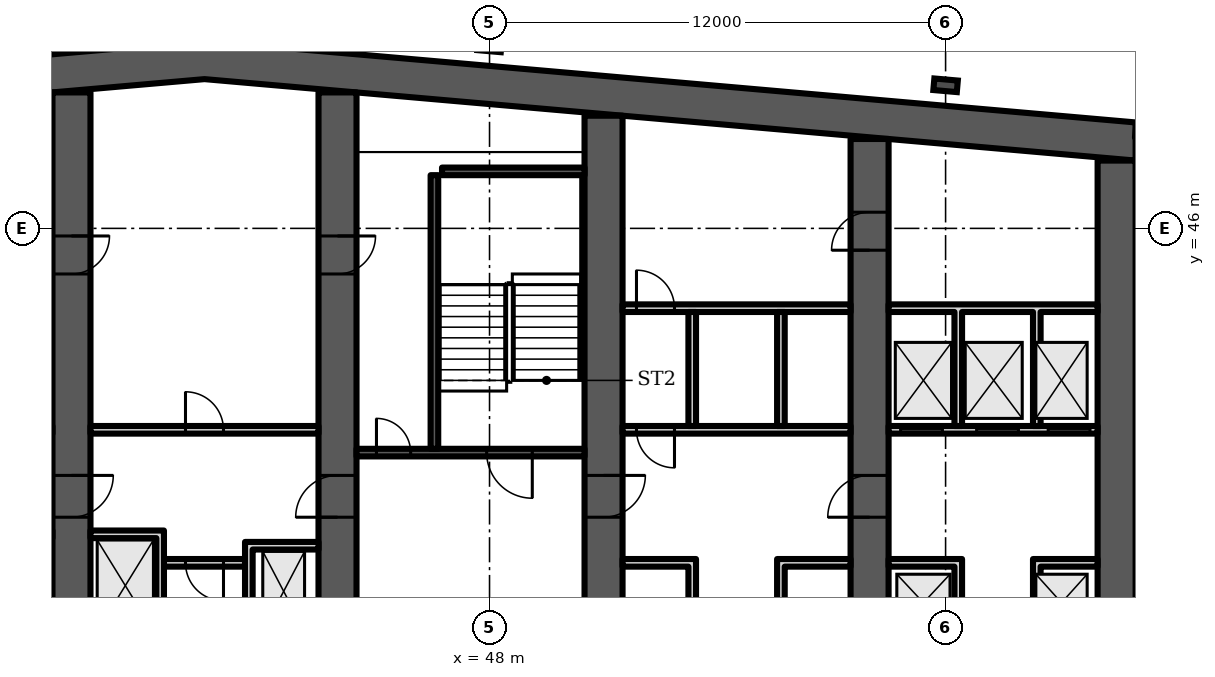
"""IFC4 building model, lengths in metres.
Left out: names, types, materials, properties, quantities, classifications, styles, units other than length and angle.
Written with IfcOpenShell. Run it as: python <this file> out.ifc"""

import sys

from ifc_helpers import new_model, si_unit, direction, frame, frame_2d, origin, origin_2d, place, context, subcontext, project, spatial, polyline, rectangle, i_section, outline, extrude, element, fill, save


model = new_model("IFC4")
c1 = context("Model", 3, precision=1e-05, world=origin(), true_north=direction((0.0, 1.0)))
c2 = subcontext(c1, "Body", "Model", "MODEL_VIEW")
j1 = project(units=[si_unit("LENGTHUNIT", "METRE"), si_unit("PLANEANGLEUNIT", "RADIAN")], contexts=[c1])
p1 = place(None, origin())
s1 = spatial("IfcSite", under=j1, at=p1, CompositionType="ELEMENT")
p2 = place(p1, origin())
s2 = spatial("IfcBuilding", under=s1, at=p2, CompositionType="ELEMENT")
p3 = place(p2, frame((0.0, 0.0, 121.9)))
s3 = spatial("IfcBuildingStorey", under=s2, at=p3, CompositionType="ELEMENT", Elevation=121.9)
p4 = place(p3, origin())
e1 = element("IfcWall", 1, at=p4, inside=s3, PredefinedType="SHEAR", context=c2, shape_type="SweptSolid", body=[
    extrude(outline(polyline([(16.0, 47.784), (40.5, 49.927), (65.0, 47.784), (65.0, 48.787), (40.5, 50.931), (16.0, 48.787), (16.0, 47.784)])), origin(), (0.0, 0.0, 1.0), 3.6),
])
p5 = place(p3, frame((37.0, 35.0, 0.0), z_axis=(0.0, 0.0, 1.0), x_axis=(0.0, 1.0, 0.0)))
e2 = element("IfcWall", 2, at=p5, inside=s3, PredefinedType="SHEAR", context=c2, shape_type="SweptSolid", body=[
    extrude(rectangle(XDim=14.577, YDim=1.0, at=frame_2d((7.289, 0.0))), origin(), (0.0, 0.0, 1.0), 3.6),
])
p6 = place(p5, frame((3.4, 0.0, 0.0)))
e3 = element("IfcOpeningElement", 3, at=p6, cuts=e2, PredefinedType="OPENING", context=c2, shape_type="SweptSolid", body=[
    extrude(rectangle(XDim=1.1, YDim=2.1, at=frame_2d((0.55, 1.05))), frame((0.0, 0.51, 0.0), z_axis=(0.0, -1.0, 0.0), x_axis=(1.0, 0.0, 0.0)), (0.0, 0.0, 1.0), 1.02),
])
p7 = place(p5, frame((9.8, 0.0, 0.0)))
e4 = element("IfcOpeningElement", 4, at=p7, cuts=e2, PredefinedType="OPENING", context=c2, shape_type="SweptSolid", body=[
    extrude(rectangle(XDim=1.0, YDim=2.1, at=frame_2d((0.5, 1.05))), frame((0.0, 0.51, 0.0), z_axis=(0.0, -1.0, 0.0), x_axis=(1.0, 0.0, 0.0)), (0.0, 0.0, 1.0), 1.02),
])
p8 = place(p3, frame((44.0, 35.0, 0.0), z_axis=(0.0, 0.0, 1.0), x_axis=(0.0, 1.0, 0.0)))
e5 = element("IfcWall", 5, at=p8, inside=s3, PredefinedType="SHEAR", context=c2, shape_type="SweptSolid", body=[
    extrude(rectangle(XDim=14.577, YDim=1.0, at=frame_2d((7.289, 0.0))), origin(), (0.0, 0.0, 1.0), 3.6),
])
p9 = place(p8, frame((3.4, 0.0, 0.0)))
e6 = element("IfcOpeningElement", 6, at=p9, cuts=e5, PredefinedType="OPENING", context=c2, shape_type="SweptSolid", body=[
    extrude(rectangle(XDim=1.1, YDim=2.1, at=frame_2d((0.55, 1.05))), frame((0.0, 0.51, 0.0), z_axis=(0.0, -1.0, 0.0), x_axis=(1.0, 0.0, 0.0)), (0.0, 0.0, 1.0), 1.02),
])
p10 = place(p8, frame((9.8, 0.0, 0.0)))
e7 = element("IfcOpeningElement", 7, at=p10, cuts=e5, PredefinedType="OPENING", context=c2, shape_type="SweptSolid", body=[
    extrude(rectangle(XDim=1.0, YDim=2.1, at=frame_2d((0.5, 1.05))), frame((0.0, 0.51, 0.0), z_axis=(0.0, -1.0, 0.0), x_axis=(1.0, 0.0, 0.0)), (0.0, 0.0, 1.0), 1.02),
])
p11 = place(p3, frame((51.0, 35.0, 0.0), z_axis=(0.0, 0.0, 1.0), x_axis=(0.0, 1.0, 0.0)))
e8 = element("IfcWall", 8, at=p11, inside=s3, PredefinedType="SHEAR", context=c2, shape_type="SweptSolid", body=[
    extrude(rectangle(XDim=13.965, YDim=1.0, at=frame_2d((6.982, 0.0))), origin(), (0.0, 0.0, 1.0), 3.6),
])
p12 = place(p11, frame((3.4, 0.0, 0.0)))
e9 = element("IfcOpeningElement", 9, at=p12, cuts=e8, PredefinedType="OPENING", context=c2, shape_type="SweptSolid", body=[
    extrude(rectangle(XDim=1.1, YDim=2.1, at=frame_2d((0.55, 1.05))), frame((0.0, 0.51, 0.0), z_axis=(0.0, -1.0, 0.0), x_axis=(1.0, 0.0, 0.0)), (0.0, 0.0, 1.0), 1.02),
])
p13 = place(p3, frame((58.0, 35.0, 0.0), z_axis=(0.0, 0.0, 1.0), x_axis=(0.0, 1.0, 0.0)))
e10 = element("IfcWall", 10, at=p13, inside=s3, PredefinedType="SHEAR", context=c2, shape_type="SweptSolid", body=[
    extrude(rectangle(XDim=13.352, YDim=1.0, at=frame_2d((6.676, 0.0))), origin(), (0.0, 0.0, 1.0), 3.6),
])
p14 = place(p13, frame((10.426, 0.0, 0.0)))
e11 = element("IfcOpeningElement", 11, at=p14, cuts=e10, PredefinedType="OPENING", context=c2, shape_type="SweptSolid", body=[
    extrude(rectangle(XDim=1.0, YDim=2.1, at=frame_2d((0.5, 1.05))), frame((0.0, 0.51, 0.0), z_axis=(0.0, -1.0, 0.0), x_axis=(1.0, 0.0, 0.0)), (0.0, 0.0, 1.0), 1.02),
])
p15 = place(p13, frame((3.4, 0.0, 0.0)))
e12 = element("IfcOpeningElement", 12, at=p15, cuts=e10, PredefinedType="OPENING", context=c2, shape_type="SweptSolid", body=[
    extrude(rectangle(XDim=1.1, YDim=2.1, at=frame_2d((0.55, 1.05))), frame((0.0, 0.51, 0.0), z_axis=(0.0, -1.0, 0.0), x_axis=(1.0, 0.0, 0.0)), (0.0, 0.0, 1.0), 1.02),
])
p16 = place(p3, frame((64.5, 35.0, 0.0), z_axis=(0.0, 0.0, 1.0), x_axis=(0.0, 1.0, 0.0)))
e13 = element("IfcWall", 13, at=p16, inside=s3, PredefinedType="SHEAR", context=c2, shape_type="SweptSolid", body=[
    extrude(rectangle(XDim=12.784, YDim=1.0, at=frame_2d((6.392, 0.0))), origin(), (0.0, 0.0, 1.0), 3.6),
])
for number, where, z_axis, x_axis in (
    (14, (48.0, 50.815, 0.0), (0.0, 0.0, 1.0), (0.087, 0.996, 0.0)),
    (15, (60.0, 49.765, 0.0), (0.0, 0.0, 1.0), (0.087, 0.996, 0.0)),
):
    element("IfcColumn", number, at=place(p3, frame(where, z_axis=z_axis, x_axis=x_axis)), inside=s3, PredefinedType="COLUMN", context=c2, shape_type="SweptSolid", body=[
        extrude(i_section(OverallWidth=0.305, OverallDepth=0.62, WebThickness=0.021, FlangeThickness=0.04, FilletRadius=0.027, at=origin_2d()), origin(), (0.0, 0.0, 1.0), 3.6),
    ])
p17 = place(p3, frame((67.983, 48.326, 0.0), z_axis=(0.0, 0.0, 1.0), x_axis=(-0.996194, 0.087168, 0.0)))
e16 = element("IfcWall", 16, at=p17, inside=s3, PredefinedType="SOLIDWALL", context=c2, shape_type="SweptSolid", body=[
    extrude(rectangle(XDim=2.994, YDim=0.4, at=frame_2d((1.497, 0.0))), origin(), (0.0, 0.0, 1.0), 3.2),
])
p18 = place(p3, frame((39.433, 37.2, 0.0), z_axis=(0.0, 0.0, 1.0), x_axis=(1.0, 0.0, 0.0)))
e17 = element("IfcWall", 17, at=p18, inside=s3, PredefinedType="PARTITIONING", context=c2, shape_type="SweptSolid", body=[
    extrude(rectangle(XDim=2.133, YDim=0.2, at=frame_2d((1.067, 0.0))), origin(), (0.0, 0.0, 1.0), 3.2),
])
p19 = place(p18, frame((0.567, 0.0, 0.0)))
e18 = element("IfcOpeningElement", 18, at=p19, cuts=e17, PredefinedType="OPENING", context=c2, shape_type="SweptSolid", body=[
    extrude(rectangle(XDim=1.0, YDim=2.1, at=frame_2d((0.5, 1.05))), frame((0.0, 0.11, 0.0), z_axis=(0.0, -1.0, 0.0), x_axis=(1.0, 0.0, 0.0)), (0.0, 0.0, 1.0), 0.22),
])
p20 = place(p3, frame((37.5, 40.7, 0.0), z_axis=(0.0, 0.0, 1.0), x_axis=(1.0, 0.0, 0.0)))
e19 = element("IfcWall", 19, at=p20, inside=s3, PredefinedType="PARTITIONING", context=c2, shape_type="SweptSolid", body=[
    extrude(rectangle(XDim=6.0, YDim=0.2, at=frame_2d((3.0, 0.0))), origin(), (0.0, 0.0, 1.0), 3.2),
])
p21 = place(p20, frame((2.5, 0.0, 0.0)))
e20 = element("IfcOpeningElement", 20, at=p21, cuts=e19, PredefinedType="OPENING", context=c2, shape_type="SweptSolid", body=[
    extrude(rectangle(XDim=1.0, YDim=2.1, at=frame_2d((0.5, 1.05))), frame((0.0, 0.11, 0.0), z_axis=(0.0, -1.0, 0.0), x_axis=(1.0, 0.0, 0.0)), (0.0, 0.0, 1.0), 0.22),
])
p22 = place(p3, origin())
e21 = element("IfcWall", 21, at=p22, inside=s3, PredefinedType="PARTITIONING", context=c2, shape_type="SweptSolid", body=[
    extrude(outline(polyline([(41.567, 37.75), (41.767, 37.75), (43.5, 37.75), (43.5, 37.55), (41.767, 37.55), (41.767, 35.0), (41.567, 35.0), (41.567, 37.75)])), origin(), (0.0, 0.0, 1.0), 3.2),
])
p23 = place(p3, origin())
e22 = element("IfcWall", 22, at=p23, inside=s3, PredefinedType="PARTITIONING", context=c2, shape_type="SweptSolid", body=[
    extrude(outline(polyline([(39.233, 37.85), (37.5, 37.85), (37.5, 38.05), (39.233, 38.05), (39.433, 38.05), (39.433, 35.0), (39.233, 35.0), (39.233, 37.85)])), origin(), (0.0, 0.0, 1.0), 3.2),
])
p24 = place(p3, frame((44.5, 40.1, 0.0), z_axis=(0.0, 0.0, 1.0), x_axis=(1.0, 0.0, 0.0)))
e23 = element("IfcWall", 23, at=p24, inside=s3, PredefinedType="SHEAR", context=c2, shape_type="SweptSolid", body=[
    extrude(rectangle(XDim=6.0, YDim=0.2, at=frame_2d((3.0, 0.0))), origin(), (0.0, 0.0, 1.0), 3.2),
])
p25 = place(p24, frame((3.425, 0.0, 0.0)))
e24 = element("IfcOpeningElement", 24, at=p25, cuts=e23, PredefinedType="OPENING", context=c2, shape_type="SweptSolid", body=[
    extrude(rectangle(XDim=1.2, YDim=2.1, at=frame_2d((0.6, 1.05))), frame((0.0, 0.11, 0.0), z_axis=(0.0, -1.0, 0.0), x_axis=(1.0, 0.0, 0.0)), (0.0, 0.0, 1.0), 0.22),
])
p26 = place(p24, frame((0.525, 0.0, 0.0)))
e25 = element("IfcOpeningElement", 25, at=p26, cuts=e23, PredefinedType="OPENING", context=c2, shape_type="SweptSolid", body=[
    extrude(rectangle(XDim=0.9, YDim=2.1, at=frame_2d((0.45, 1.05))), frame((0.0, 0.11, 0.0), z_axis=(0.0, -1.0, 0.0), x_axis=(1.0, 0.0, 0.0)), (0.0, 0.0, 1.0), 0.22),
])
p27 = place(p3, frame((46.55, 40.2, 0.0), z_axis=(0.0, 0.0, 1.0), x_axis=(0.0, 1.0, 0.0)))
e26 = element("IfcWall", 26, at=p27, inside=s3, PredefinedType="SHEAR", context=c2, shape_type="SweptSolid", body=[
    extrude(rectangle(XDim=7.2, YDim=0.2, at=frame_2d((3.6, 0.0))), origin(), (0.0, 0.0, 1.0), 3.2),
])
p28 = place(p3, frame((46.75, 47.5, 0.0), z_axis=(0.0, 0.0, 1.0), x_axis=(1.0, 0.0, 0.0)))
e27 = element("IfcWall", 27, at=p28, inside=s3, PredefinedType="SHEAR", context=c2, shape_type="SweptSolid", body=[
    extrude(rectangle(XDim=3.75, YDim=0.2, at=frame_2d((1.875, 0.0))), origin(), (0.0, 0.0, 1.0), 3.2),
])
p29 = place(p3, frame((51.5, 40.7, 0.0), z_axis=(0.0, 0.0, 1.0), x_axis=(1.0, 0.0, 0.0)))
e28 = element("IfcWall", 28, at=p29, inside=s3, PredefinedType="PARTITIONING", context=c2, shape_type="SweptSolid", body=[
    extrude(rectangle(XDim=6.0, YDim=0.2, at=frame_2d((3.0, 0.0))), origin(), (0.0, 0.0, 1.0), 3.2),
])
p30 = place(p29, frame((0.367, 0.0, 0.0)))
e29 = element("IfcOpeningElement", 29, at=p30, cuts=e28, PredefinedType="OPENING", context=c2, shape_type="SweptSolid", body=[
    extrude(rectangle(XDim=1.0, YDim=2.1, at=frame_2d((0.5, 1.05))), frame((0.0, 0.11, 0.0), z_axis=(0.0, -1.0, 0.0), x_axis=(1.0, 0.0, 0.0)), (0.0, 0.0, 1.0), 0.22),
])
p31 = place(p3, frame((51.5, 43.9, 0.0), z_axis=(0.0, 0.0, 1.0), x_axis=(1.0, 0.0, 0.0)))
e30 = element("IfcWall", 30, at=p31, inside=s3, PredefinedType="PARTITIONING", context=c2, shape_type="SweptSolid", body=[
    extrude(rectangle(XDim=6.0, YDim=0.2, at=frame_2d((3.0, 0.0))), origin(), (0.0, 0.0, 1.0), 3.2),
])
p32 = place(p31, frame((0.367, 0.0, 0.0)))
e31 = element("IfcOpeningElement", 31, at=p32, cuts=e30, PredefinedType="OPENING", context=c2, shape_type="SweptSolid", body=[
    extrude(rectangle(XDim=1.0, YDim=2.1, at=frame_2d((0.5, 1.05))), frame((0.0, 0.11, 0.0), z_axis=(0.0, -1.0, 0.0), x_axis=(1.0, 0.0, 0.0)), (0.0, 0.0, 1.0), 0.22),
])
p33 = place(p3, origin())
e32 = element("IfcWall", 32, at=p33, inside=s3, PredefinedType="PARTITIONING", context=c2, shape_type="SweptSolid", body=[
    extrude(outline(polyline([(53.233, 37.1), (51.5, 37.1), (51.5, 37.3), (53.233, 37.3), (53.433, 37.3), (53.433, 35.0), (53.233, 35.0), (53.233, 37.1)])), origin(), (0.0, 0.0, 1.0), 3.2),
])
p34 = place(p3, origin())
e33 = element("IfcWall", 33, at=p34, inside=s3, PredefinedType="PARTITIONING", context=c2, shape_type="SweptSolid", body=[
    extrude(outline(polyline([(55.567, 37.3), (55.767, 37.3), (57.5, 37.3), (57.5, 37.1), (55.767, 37.1), (55.767, 35.0), (55.567, 35.0), (55.567, 37.3)])), origin(), (0.0, 0.0, 1.0), 3.2),
])
p35 = place(p3, origin())
e34 = element("IfcWall", 34, at=p35, inside=s3, PredefinedType="PARTITIONING", context=c2, shape_type="SweptSolid", body=[
    extrude(outline(polyline([(53.233, 40.8), (53.233, 43.8), (53.433, 43.8), (53.433, 40.8), (53.233, 40.8)])), origin(), (0.0, 0.0, 1.0), 3.2),
])
p36 = place(p3, origin())
e35 = element("IfcWall", 35, at=p36, inside=s3, PredefinedType="PARTITIONING", context=c2, shape_type="SweptSolid", body=[
    extrude(outline(polyline([(55.567, 40.8), (55.567, 43.8), (55.767, 43.8), (55.767, 40.8), (55.567, 40.8)])), origin(), (0.0, 0.0, 1.0), 3.2),
])
p37 = place(p3, frame((58.5, 40.7, 0.0), z_axis=(0.0, 0.0, 1.0), x_axis=(1.0, 0.0, 0.0)))
e36 = element("IfcWall", 36, at=p37, inside=s3, PredefinedType="PARTITIONING", context=c2, shape_type="SweptSolid", body=[
    extrude(rectangle(XDim=5.5, YDim=0.2, at=frame_2d((2.75, 0.0))), origin(), (0.0, 0.0, 1.0), 3.2),
])
p38 = place(p37, frame((0.317, 0.0, 0.0)))
e37 = element("IfcOpeningElement", 37, at=p38, cuts=e36, PredefinedType="OPENING", context=c2, shape_type="SweptSolid", body=[
    extrude(rectangle(XDim=1.1, YDim=2.1, at=frame_2d((0.55, 1.05))), frame((0.0, 0.11, 0.0), z_axis=(0.0, -1.0, 0.0), x_axis=(1.0, 0.0, 0.0)), (0.0, 0.0, 1.0), 0.22),
])
p39 = place(p37, frame((2.317, 0.0, 0.0)))
e38 = element("IfcOpeningElement", 38, at=p39, cuts=e36, PredefinedType="OPENING", context=c2, shape_type="SweptSolid", body=[
    extrude(rectangle(XDim=1.1, YDim=2.1, at=frame_2d((0.55, 1.05))), frame((0.0, 0.11, 0.0), z_axis=(0.0, -1.0, 0.0), x_axis=(1.0, 0.0, 0.0)), (0.0, 0.0, 1.0), 0.22),
])
p40 = place(p37, frame((4.2, 0.0, 0.0)))
e39 = element("IfcOpeningElement", 39, at=p40, cuts=e36, PredefinedType="OPENING", context=c2, shape_type="SweptSolid", body=[
    extrude(rectangle(XDim=1.1, YDim=2.1, at=frame_2d((0.55, 1.05))), frame((0.0, 0.11, 0.0), z_axis=(0.0, -1.0, 0.0), x_axis=(1.0, 0.0, 0.0)), (0.0, 0.0, 1.0), 0.22),
])
p41 = place(p3, origin())
e40 = element("IfcWall", 40, at=p41, inside=s3, PredefinedType="PARTITIONING", context=c2, shape_type="SweptSolid", body=[
    extrude(outline(polyline([(60.233, 37.1), (58.5, 37.1), (58.5, 37.3), (60.233, 37.3), (60.433, 37.3), (60.433, 35.0), (60.233, 35.0), (60.233, 37.1)])), origin(), (0.0, 0.0, 1.0), 3.2),
])
p42 = place(p3, origin())
e41 = element("IfcWall", 41, at=p42, inside=s3, PredefinedType="PARTITIONING", context=c2, shape_type="SweptSolid", body=[
    extrude(outline(polyline([(62.3, 37.3), (62.5, 37.3), (64.0, 37.3), (64.0, 37.1), (62.5, 37.1), (62.5, 35.0), (62.3, 35.0), (62.3, 37.3)])), origin(), (0.0, 0.0, 1.0), 3.2),
])
p43 = place(p3, origin())
e42 = element("IfcWall", 42, at=p43, inside=s3, PredefinedType="PARTITIONING", context=c2, shape_type="SweptSolid", body=[
    extrude(outline(polyline([(60.433, 40.8), (60.233, 40.8), (60.233, 43.8), (58.5, 43.8), (58.5, 44.0), (64.0, 44.0), (64.0, 43.8), (62.5, 43.8), (62.5, 40.8), (62.3, 40.8), (62.3, 43.8), (60.433, 43.8), (60.433, 40.8)])), origin(), (0.0, 0.0, 1.0), 3.2),
])
p44 = place(p19, origin())
e43 = element("IfcDoor", 43, at=p44, inside=s3, OperationType="SINGLE_SWING_RIGHT", PredefinedType="DOOR", context=c2, shape_type="SweptSolid", body=[
    extrude(rectangle(XDim=1.0, YDim=2.1, at=frame_2d((0.5, 1.05))), frame((0.0, 0.025, 0.0), z_axis=(0.0, -1.0, 0.0), x_axis=(1.0, 0.0, 0.0)), (0.0, 0.0, 1.0), 0.05),
])
fill(e18, e43)
p45 = place(p21, origin())
e44 = element("IfcDoor", 44, at=p45, inside=s3, OperationType="SINGLE_SWING_LEFT", PredefinedType="DOOR", context=c2, shape_type="SweptSolid", body=[
    extrude(rectangle(XDim=1.0, YDim=2.1, at=frame_2d((0.5, 1.05))), frame((0.0, 0.025, 0.0), z_axis=(0.0, -1.0, 0.0), x_axis=(1.0, 0.0, 0.0)), (0.0, 0.0, 1.0), 0.05),
])
fill(e20, e44)
p46 = place(p25, origin())
e45 = element("IfcDoor", 45, at=p46, inside=s3, OperationType="SINGLE_SWING_RIGHT", PredefinedType="DOOR", context=c2, shape_type="SweptSolid", body=[
    extrude(rectangle(XDim=1.2, YDim=2.1, at=frame_2d((0.6, 1.05))), frame((0.0, 0.025, 0.0), z_axis=(0.0, -1.0, 0.0), x_axis=(1.0, 0.0, 0.0)), (0.0, 0.0, 1.0), 0.05),
])
fill(e24, e45)
p47 = place(p26, origin())
e46 = element("IfcDoor", 46, at=p47, inside=s3, OperationType="SINGLE_SWING_LEFT", PredefinedType="DOOR", context=c2, shape_type="SweptSolid", body=[
    extrude(rectangle(XDim=0.9, YDim=2.1, at=frame_2d((0.45, 1.05))), frame((0.0, 0.025, 0.0), z_axis=(0.0, -1.0, 0.0), x_axis=(1.0, 0.0, 0.0)), (0.0, 0.0, 1.0), 0.05),
])
fill(e25, e46)
p48 = place(p30, origin())
e47 = element("IfcDoor", 47, at=p48, inside=s3, OperationType="SINGLE_SWING_RIGHT", PredefinedType="DOOR", context=c2, shape_type="SweptSolid", body=[
    extrude(rectangle(XDim=1.0, YDim=2.1, at=frame_2d((0.5, 1.05))), frame((0.0, 0.025, 0.0), z_axis=(0.0, -1.0, 0.0), x_axis=(1.0, 0.0, 0.0)), (0.0, 0.0, 1.0), 0.05),
])
fill(e29, e47)
p49 = place(p32, origin())
e48 = element("IfcDoor", 48, at=p49, inside=s3, OperationType="SINGLE_SWING_LEFT", PredefinedType="DOOR", context=c2, shape_type="SweptSolid", body=[
    extrude(rectangle(XDim=1.0, YDim=2.1, at=frame_2d((0.5, 1.05))), frame((0.0, 0.025, 0.0), z_axis=(0.0, -1.0, 0.0), x_axis=(1.0, 0.0, 0.0)), (0.0, 0.0, 1.0), 0.05),
])
fill(e31, e48)
p50 = place(p38, origin())
e49 = element("IfcDoor", 49, at=p50, inside=s3, OperationType="DOUBLE_DOOR_SLIDING", PredefinedType="DOOR", context=c2, shape_type="SweptSolid", body=[
    extrude(rectangle(XDim=1.1, YDim=2.1, at=frame_2d((0.55, 1.05))), frame((0.0, 0.025, 0.0), z_axis=(0.0, -1.0, 0.0), x_axis=(1.0, 0.0, 0.0)), (0.0, 0.0, 1.0), 0.05),
])
fill(e37, e49)
p51 = place(p39, origin())
e50 = element("IfcDoor", 50, at=p51, inside=s3, OperationType="DOUBLE_DOOR_SLIDING", PredefinedType="DOOR", context=c2, shape_type="SweptSolid", body=[
    extrude(rectangle(XDim=1.1, YDim=2.1, at=frame_2d((0.55, 1.05))), frame((0.0, 0.025, 0.0), z_axis=(0.0, -1.0, 0.0), x_axis=(1.0, 0.0, 0.0)), (0.0, 0.0, 1.0), 0.05),
])
fill(e38, e50)
p52 = place(p40, origin())
e51 = element("IfcDoor", 51, at=p52, inside=s3, OperationType="DOUBLE_DOOR_SLIDING", PredefinedType="DOOR", context=c2, shape_type="SweptSolid", body=[
    extrude(rectangle(XDim=1.1, YDim=2.1, at=frame_2d((0.55, 1.05))), frame((0.0, 0.025, 0.0), z_axis=(0.0, -1.0, 0.0), x_axis=(1.0, 0.0, 0.0)), (0.0, 0.0, 1.0), 0.05),
])
fill(e39, e51)
p53 = place(p14, origin())
e52 = element("IfcDoor", 52, at=p53, inside=s3, OperationType="SINGLE_SWING_LEFT", PredefinedType="DOOR", context=c2, shape_type="SweptSolid", body=[
    extrude(rectangle(XDim=1.0, YDim=2.1, at=frame_2d((0.5, 1.05))), frame((0.0, 0.5, 0.0), z_axis=(0.0, -1.0, 0.0), x_axis=(1.0, 0.0, 0.0)), (0.0, 0.0, 1.0), 1.0),
])
fill(e11, e52)
p54 = place(p6, origin())
e53 = element("IfcDoor", 53, at=p54, inside=s3, OperationType="SINGLE_SWING_RIGHT", PredefinedType="DOOR", context=c2, shape_type="SweptSolid", body=[
    extrude(rectangle(XDim=1.1, YDim=2.1, at=frame_2d((0.55, 1.05))), frame((0.0, 0.025, 0.0), z_axis=(0.0, -1.0, 0.0), x_axis=(1.0, 0.0, 0.0)), (0.0, 0.0, 1.0), 0.05),
])
fill(e3, e53)
p55 = place(p7, origin())
e54 = element("IfcDoor", 54, at=p55, inside=s3, OperationType="SINGLE_SWING_RIGHT", PredefinedType="DOOR", context=c2, shape_type="SweptSolid", body=[
    extrude(rectangle(XDim=1.0, YDim=2.1, at=frame_2d((0.5, 1.05))), frame((0.0, 0.5, 0.0), z_axis=(0.0, -1.0, 0.0), x_axis=(1.0, 0.0, 0.0)), (0.0, 0.0, 1.0), 1.0),
])
fill(e4, e54)
p56 = place(p9, origin())
e55 = element("IfcDoor", 55, at=p56, inside=s3, OperationType="SINGLE_SWING_LEFT", PredefinedType="DOOR", context=c2, shape_type="SweptSolid", body=[
    extrude(rectangle(XDim=1.1, YDim=2.1, at=frame_2d((0.55, 1.05))), frame((0.0, 0.025, 0.0), z_axis=(0.0, -1.0, 0.0), x_axis=(1.0, 0.0, 0.0)), (0.0, 0.0, 1.0), 0.05),
])
fill(e6, e55)
p57 = place(p10, origin())
e56 = element("IfcDoor", 56, at=p57, inside=s3, OperationType="SINGLE_SWING_RIGHT", PredefinedType="DOOR", context=c2, shape_type="SweptSolid", body=[
    extrude(rectangle(XDim=1.0, YDim=2.1, at=frame_2d((0.5, 1.05))), frame((0.0, 0.5, 0.0), z_axis=(0.0, -1.0, 0.0), x_axis=(1.0, 0.0, 0.0)), (0.0, 0.0, 1.0), 1.0),
])
fill(e7, e56)
p58 = place(p12, origin())
e57 = element("IfcDoor", 57, at=p58, inside=s3, OperationType="SINGLE_SWING_RIGHT", PredefinedType="DOOR", context=c2, shape_type="SweptSolid", body=[
    extrude(rectangle(XDim=1.1, YDim=2.1, at=frame_2d((0.55, 1.05))), frame((0.0, 0.025, 0.0), z_axis=(0.0, -1.0, 0.0), x_axis=(1.0, 0.0, 0.0)), (0.0, 0.0, 1.0), 0.05),
])
fill(e9, e57)
p59 = place(p15, origin())
e58 = element("IfcDoor", 58, at=p59, inside=s3, OperationType="SINGLE_SWING_LEFT", PredefinedType="DOOR", context=c2, shape_type="SweptSolid", body=[
    extrude(rectangle(XDim=1.1, YDim=2.1, at=frame_2d((0.55, 1.05))), frame((0.0, 0.025, 0.0), z_axis=(0.0, -1.0, 0.0), x_axis=(1.0, 0.0, 0.0)), (0.0, 0.0, 1.0), 0.05),
])
fill(e12, e58)
save(model, sys.argv[1])
